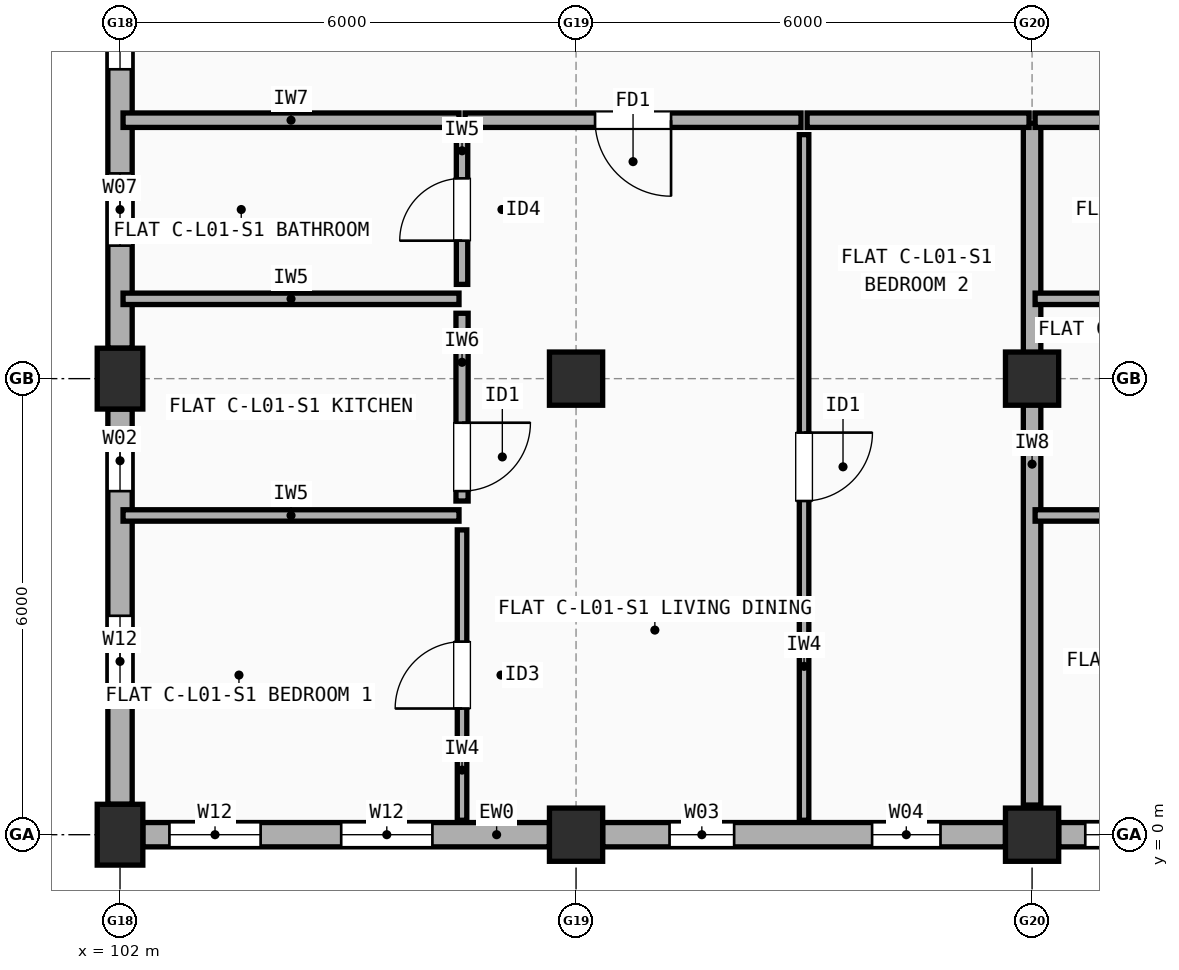
"""IFC4 building model, lengths in metres.
Left out: names, types, materials, properties, quantities, classifications, styles, units other than length and angle.
Written with IfcOpenShell. Run it as: python <this file> out.ifc"""

import sys

from ifc_helpers import new_model, si_unit, direction, frame, frame_2d, origin, origin_2d, place, context, subcontext, project, spatial, rectangle, extrude, element, fill, save


model = new_model("IFC4")
c1 = context("Model", 3, precision=1e-05, world=origin(), true_north=direction((0.0, 1.0)))
c2 = subcontext(c1, "Body", "Model", "MODEL_VIEW")
j1 = project(units=[si_unit("LENGTHUNIT", "METRE"), si_unit("PLANEANGLEUNIT", "RADIAN")], contexts=[c1])
p1 = place(None, origin())
s1 = spatial("IfcSite", under=j1, at=p1, CompositionType="ELEMENT")
p2 = place(p1, origin())
s2 = spatial("IfcBuilding", under=s1, at=p2, CompositionType="ELEMENT")
p3 = place(p2, frame((0.0, 0.0, 4.5)))
s3 = spatial("IfcBuildingStorey", under=s2, at=p3, CompositionType="ELEMENT", Elevation=4.5)
for number, where, z_axis, x_axis in (
    (1, (102.0, 0.0, 0.0), (0.0, 0.0, 1.0), (1.0, 0.0, 0.0)),
    (2, (102.0, 6.0, 0.0), (0.0, 0.0, 1.0), (1.0, 0.0, 0.0)),
):
    element("IfcColumn", number, at=place(p3, frame(where, z_axis=z_axis, x_axis=x_axis)), inside=s3, PredefinedType="COLUMN", context=c2, shape_type="SweptSolid", body=[
        extrude(rectangle(XDim=0.6, YDim=0.8, at=origin_2d()), origin(), (0.0, 0.0, 1.0), 2.945),
    ])
for number, where, z_axis, x_axis in (
    (3, (108.0, 0.0, 0.0), (0.0, 0.0, 1.0), (1.0, 0.0, 0.0)),
    (4, (108.0, 6.0, 0.0), (0.0, 0.0, 1.0), (1.0, 0.0, 0.0)),
    (5, (114.0, 0.0, 0.0), (0.0, 0.0, 1.0), (1.0, 0.0, 0.0)),
    (6, (114.0, 6.0, 0.0), (0.0, 0.0, 1.0), (1.0, 0.0, 0.0)),
):
    element("IfcColumn", number, at=place(p3, frame(where, z_axis=z_axis, x_axis=x_axis)), inside=s3, PredefinedType="COLUMN", context=c2, shape_type="SweptSolid", body=[
        extrude(rectangle(XDim=0.7, YDim=0.7, at=origin_2d()), origin(), (0.0, 0.0, 1.0), 2.945),
    ])
p4 = place(p3, frame((102.3, 0.0, 0.0), z_axis=(0.0, 0.0, 1.0), x_axis=(1.0, 0.0, 0.0)))
e7 = element("IfcWall", 7, at=p4, inside=s3, PredefinedType="STANDARD", context=c2, shape_type="SweptSolid", body=[
    extrude(rectangle(XDim=5.35, YDim=0.32, at=frame_2d((2.675, 0.0))), origin(), (0.0, 0.0, 1.0), 2.427),
])
p5 = place(p4, frame((0.35, 0.0, 0.9)))
e8 = element("IfcOpeningElement", 8, at=p5, cuts=e7, PredefinedType="OPENING", context=c2, shape_type="SweptSolid", body=[
    extrude(rectangle(XDim=1.2, YDim=1.35, at=frame_2d((0.6, 0.675))), frame((0.0, 0.17, 0.0), z_axis=(0.0, -1.0, 0.0), x_axis=(1.0, 0.0, 0.0)), (0.0, 0.0, 1.0), 0.34),
])
p6 = place(p4, frame((2.61, 0.0, 0.9)))
e9 = element("IfcOpeningElement", 9, at=p6, cuts=e7, PredefinedType="OPENING", context=c2, shape_type="SweptSolid", body=[
    extrude(rectangle(XDim=1.2, YDim=1.35, at=frame_2d((0.6, 0.675))), frame((0.0, 0.17, 0.0), z_axis=(0.0, -1.0, 0.0), x_axis=(1.0, 0.0, 0.0)), (0.0, 0.0, 1.0), 0.34),
])
p7 = place(p3, frame((108.35, 0.0, 0.0), z_axis=(0.0, 0.0, 1.0), x_axis=(1.0, 0.0, 0.0)))
e10 = element("IfcWall", 10, at=p7, inside=s3, PredefinedType="STANDARD", context=c2, shape_type="SweptSolid", body=[
    extrude(rectangle(XDim=5.3, YDim=0.32, at=frame_2d((2.65, 0.0))), origin(), (0.0, 0.0, 1.0), 2.427),
])
p8 = place(p7, frame((0.88, 0.0, 0.9)))
e11 = element("IfcOpeningElement", 11, at=p8, cuts=e10, PredefinedType="OPENING", context=c2, shape_type="SweptSolid", body=[
    extrude(rectangle(XDim=0.85, YDim=1.25, at=frame_2d((0.425, 0.625))), frame((0.0, 0.17, 0.0), z_axis=(0.0, -1.0, 0.0), x_axis=(1.0, 0.0, 0.0)), (0.0, 0.0, 1.0), 0.34),
])
p9 = place(p7, frame((3.545, 0.0, 0.9)))
e12 = element("IfcOpeningElement", 12, at=p9, cuts=e10, PredefinedType="OPENING", context=c2, shape_type="SweptSolid", body=[
    extrude(rectangle(XDim=0.9, YDim=1.3, at=frame_2d((0.45, 0.65))), frame((0.0, 0.17, 0.0), z_axis=(0.0, -1.0, 0.0), x_axis=(1.0, 0.0, 0.0)), (0.0, 0.0, 1.0), 0.34),
])
p10 = place(p3, frame((114.35, 0.0, 0.0), z_axis=(0.0, 0.0, 1.0), x_axis=(1.0, 0.0, 0.0)))
e13 = element("IfcWall", 13, at=p10, inside=s3, PredefinedType="STANDARD", context=c2, shape_type="SweptSolid", body=[
    extrude(rectangle(XDim=5.3, YDim=0.32, at=frame_2d((2.65, 0.0))), origin(), (0.0, 0.0, 1.0), 2.427),
])
p11 = place(p10, frame((0.35, 0.0, 0.9)))
e14 = element("IfcOpeningElement", 14, at=p11, cuts=e13, PredefinedType="OPENING", context=c2, shape_type="SweptSolid", body=[
    extrude(rectangle(XDim=0.95, YDim=1.35, at=frame_2d((0.475, 0.675))), frame((0.0, 0.17, 0.0), z_axis=(0.0, -1.0, 0.0), x_axis=(1.0, 0.0, 0.0)), (0.0, 0.0, 1.0), 0.34),
])
p12 = place(p10, frame((2.81, 0.0, 0.9)))
e15 = element("IfcOpeningElement", 15, at=p12, cuts=e13, PredefinedType="OPENING", context=c2, shape_type="SweptSolid", body=[
    extrude(rectangle(XDim=0.95, YDim=1.35, at=frame_2d((0.475, 0.675))), frame((0.0, 0.17, 0.0), z_axis=(0.0, -1.0, 0.0), x_axis=(1.0, 0.0, 0.0)), (0.0, 0.0, 1.0), 0.34),
])
p13 = place(p3, frame((102.0, 11.6, 0.0), z_axis=(0.0, 0.0, 1.0), x_axis=(0.0, -1.0, 0.0)))
e16 = element("IfcWall", 16, at=p13, inside=s3, PredefinedType="STANDARD", context=c2, shape_type="SweptSolid", body=[
    extrude(rectangle(XDim=5.2, YDim=0.32, at=frame_2d((2.6, 0.0))), origin(), (0.0, 0.0, 1.0), 2.427),
])
p14 = place(p13, frame((0.63, 0.0, 0.9)))
e17 = element("IfcOpeningElement", 17, at=p14, cuts=e16, PredefinedType="OPENING", context=c2, shape_type="SweptSolid", body=[
    extrude(rectangle(XDim=0.9, YDim=1.3, at=frame_2d((0.45, 0.65))), frame((0.0, 0.17, 0.0), z_axis=(0.0, -1.0, 0.0), x_axis=(1.0, 0.0, 0.0)), (0.0, 0.0, 1.0), 0.34),
])
p15 = place(p13, frame((2.9, 0.0, 0.9)))
e18 = element("IfcOpeningElement", 18, at=p15, cuts=e16, PredefinedType="OPENING", context=c2, shape_type="SweptSolid", body=[
    extrude(rectangle(XDim=0.95, YDim=1.35, at=frame_2d((0.475, 0.675))), frame((0.0, 0.17, 0.0), z_axis=(0.0, -1.0, 0.0), x_axis=(1.0, 0.0, 0.0)), (0.0, 0.0, 1.0), 0.34),
])
p16 = place(p3, frame((102.0, 5.6, 0.0), z_axis=(0.0, 0.0, 1.0), x_axis=(0.0, -1.0, 0.0)))
e19 = element("IfcWall", 19, at=p16, inside=s3, PredefinedType="STANDARD", context=c2, shape_type="SweptSolid", body=[
    extrude(rectangle(XDim=5.2, YDim=0.32, at=frame_2d((2.6, 0.0))), origin(), (0.0, 0.0, 1.0), 2.427),
])
p17 = place(p16, frame((0.28, 0.0, 0.9)))
e20 = element("IfcOpeningElement", 20, at=p17, cuts=e19, PredefinedType="OPENING", context=c2, shape_type="SweptSolid", body=[
    extrude(rectangle(XDim=0.8, YDim=1.2, at=frame_2d((0.4, 0.6))), frame((0.0, 0.17, 0.0), z_axis=(0.0, -1.0, 0.0), x_axis=(1.0, 0.0, 0.0)), (0.0, 0.0, 1.0), 0.34),
])
p18 = place(p16, frame((2.72, 0.0, 0.9)))
e21 = element("IfcOpeningElement", 21, at=p18, cuts=e19, PredefinedType="OPENING", context=c2, shape_type="SweptSolid", body=[
    extrude(rectangle(XDim=1.2, YDim=1.35, at=frame_2d((0.6, 0.675))), frame((0.0, 0.17, 0.0), z_axis=(0.0, -1.0, 0.0), x_axis=(1.0, 0.0, 0.0)), (0.0, 0.0, 1.0), 0.34),
])
p19 = place(p3, frame((114.0, 0.39, 0.0), z_axis=(0.0, 0.0, 1.0), x_axis=(0.0, 1.0, 0.0)))
e22 = element("IfcWall", 22, at=p19, inside=s3, PredefinedType="SOLIDWALL", context=c2, shape_type="SweptSolid", body=[
    extrude(rectangle(XDim=8.97, YDim=0.23, at=frame_2d((4.485, 0.0))), origin(), (0.0, 0.0, 1.0), 2.327),
])
p20 = place(p3, frame((102.04, 9.4, 0.0), z_axis=(0.0, 0.0, 1.0), x_axis=(1.0, 0.0, 0.0)))
e23 = element("IfcWall", 23, at=p20, inside=s3, PredefinedType="SOLIDWALL", context=c2, shape_type="SweptSolid", body=[
    extrude(rectangle(XDim=4.42, YDim=0.19, at=frame_2d((2.21, 0.0))), origin(), (0.0, 0.0, 1.0), 2.427),
])
p21 = place(p3, frame((106.54, 9.4, 0.0), z_axis=(0.0, 0.0, 1.0), x_axis=(1.0, 0.0, 0.0)))
e24 = element("IfcWall", 24, at=p21, inside=s3, PredefinedType="SOLIDWALL", context=c2, shape_type="SweptSolid", body=[
    extrude(rectangle(XDim=4.42, YDim=0.19, at=frame_2d((2.21, 0.0))), origin(), (0.0, 0.0, 1.0), 2.327),
])
p22 = place(p21, frame((1.71, 0.0, 0.0)))
e25 = element("IfcOpeningElement", 25, at=p22, cuts=e24, PredefinedType="OPENING", context=c2, shape_type="SweptSolid", body=[
    extrude(rectangle(XDim=1.0, YDim=2.15, at=frame_2d((0.5, 1.075))), frame((0.0, 0.105, 0.0), z_axis=(0.0, -1.0, 0.0), x_axis=(1.0, 0.0, 0.0)), (0.0, 0.0, 1.0), 0.21),
])
p23 = place(p3, frame((106.5, 0.19, 0.0), z_axis=(0.0, 0.0, 1.0), x_axis=(0.0, 1.0, 0.0)))
e26 = element("IfcWall", 26, at=p23, inside=s3, PredefinedType="PARTITIONING", context=c2, shape_type="SweptSolid", body=[
    extrude(rectangle(XDim=3.82, YDim=0.125, at=frame_2d((1.91, 0.0))), origin(), (0.0, 0.0, 1.0), 2.945),
])
p24 = place(p23, frame((1.47, 0.0, 0.0)))
e27 = element("IfcOpeningElement", 27, at=p24, cuts=e26, PredefinedType="OPENING", context=c2, shape_type="SweptSolid", body=[
    extrude(rectangle(XDim=0.88, YDim=2.1, at=frame_2d((0.44, 1.05))), frame((0.0, 0.073, 0.0), z_axis=(0.0, -1.0, 0.0), x_axis=(1.0, 0.0, 0.0)), (0.0, 0.0, 1.0), 0.145),
])
p25 = place(p3, frame((106.5, 4.39, 0.0), z_axis=(0.0, 0.0, 1.0), x_axis=(0.0, 1.0, 0.0)))
e28 = element("IfcWall", 28, at=p25, inside=s3, PredefinedType="PLUMBINGWALL", context=c2, shape_type="SweptSolid", body=[
    extrude(rectangle(XDim=2.47, YDim=0.16, at=frame_2d((1.235, 0.0))), origin(), (0.0, 0.0, 1.0), 2.427),
])
p26 = place(p25, frame((0.13, 0.0, 0.0)))
e29 = element("IfcOpeningElement", 29, at=p26, cuts=e28, PredefinedType="OPENING", context=c2, shape_type="SweptSolid", body=[
    extrude(rectangle(XDim=0.9, YDim=2.1, at=frame_2d((0.45, 1.05))), frame((0.0, 0.09, 0.0), z_axis=(0.0, -1.0, 0.0), x_axis=(1.0, 0.0, 0.0)), (0.0, 0.0, 1.0), 0.18),
])
p27 = place(p3, frame((106.5, 7.24, 0.0), z_axis=(0.0, 0.0, 1.0), x_axis=(0.0, 1.0, 0.0)))
e30 = element("IfcWall", 30, at=p27, inside=s3, PredefinedType="PARTITIONING", context=c2, shape_type="SweptSolid", body=[
    extrude(rectangle(XDim=1.97, YDim=0.15, at=frame_2d((0.985, 0.0))), origin(), (0.0, 0.0, 1.0), 2.945),
])
p28 = place(p27, frame((0.575, 0.0, 0.0)))
e31 = element("IfcOpeningElement", 31, at=p28, cuts=e30, PredefinedType="OPENING", context=c2, shape_type="SweptSolid", body=[
    extrude(rectangle(XDim=0.82, YDim=2.08, at=frame_2d((0.41, 1.04))), frame((0.0, 0.085, 0.0), z_axis=(0.0, -1.0, 0.0), x_axis=(1.0, 0.0, 0.0)), (0.0, 0.0, 1.0), 0.17),
])
for number, where, z_axis, x_axis in (
    (32, (102.04, 4.2, 0.0), (0.0, 0.0, 1.0), (1.0, 0.0, 0.0)),
    (33, (102.04, 7.05, 0.0), (0.0, 0.0, 1.0), (1.0, 0.0, 0.0)),
):
    element("IfcWall", number, at=place(p3, frame(where, z_axis=z_axis, x_axis=x_axis)), inside=s3, PredefinedType="PARTITIONING", context=c2, shape_type="SweptSolid", body=[
        extrude(rectangle(XDim=4.42, YDim=0.15, at=frame_2d((2.21, 0.0))), origin(), (0.0, 0.0, 1.0), 2.427),
    ])
p29 = place(p3, frame((111.04, 9.4, 0.0), z_axis=(0.0, 0.0, 1.0), x_axis=(1.0, 0.0, 0.0)))
e34 = element("IfcWall", 34, at=p29, inside=s3, PredefinedType="SOLIDWALL", context=c2, shape_type="SweptSolid", body=[
    extrude(rectangle(XDim=2.92, YDim=0.19, at=frame_2d((1.46, 0.0))), origin(), (0.0, 0.0, 1.0), 2.327),
])
p30 = place(p3, frame((111.0, 0.19, 0.0), z_axis=(0.0, 0.0, 1.0), x_axis=(0.0, 1.0, 0.0)))
e35 = element("IfcWall", 35, at=p30, inside=s3, PredefinedType="PARTITIONING", context=c2, shape_type="SweptSolid", body=[
    extrude(rectangle(XDim=9.02, YDim=0.125, at=frame_2d((4.51, 0.0))), origin(), (0.0, 0.0, 1.0), 2.427),
])
p31 = place(p30, frame((4.2, 0.0, 0.0)))
e36 = element("IfcOpeningElement", 36, at=p31, cuts=e35, PredefinedType="OPENING", context=c2, shape_type="SweptSolid", body=[
    extrude(rectangle(XDim=0.9, YDim=2.1, at=frame_2d((0.45, 1.05))), frame((0.0, 0.073, 0.0), z_axis=(0.0, -1.0, 0.0), x_axis=(1.0, 0.0, 0.0)), (0.0, 0.0, 1.0), 0.145),
])
p32 = place(p3, frame((114.04, 9.4, 0.0), z_axis=(0.0, 0.0, 1.0), x_axis=(1.0, 0.0, 0.0)))
e37 = element("IfcWall", 37, at=p32, inside=s3, PredefinedType="SOLIDWALL", context=c2, shape_type="SweptSolid", body=[
    extrude(rectangle(XDim=4.42, YDim=0.19, at=frame_2d((2.21, 0.0))), origin(), (0.0, 0.0, 1.0), 2.327),
])
for number, where, z_axis, x_axis in (
    (38, (114.04, 4.2, 0.0), (0.0, 0.0, 1.0), (1.0, 0.0, 0.0)),
    (39, (114.04, 7.05, 0.0), (0.0, 0.0, 1.0), (1.0, 0.0, 0.0)),
):
    element("IfcWall", number, at=place(p3, frame(where, z_axis=z_axis, x_axis=x_axis)), inside=s3, PredefinedType="PARTITIONING", context=c2, shape_type="SweptSolid", body=[
        extrude(rectangle(XDim=4.42, YDim=0.15, at=frame_2d((2.21, 0.0))), origin(), (0.0, 0.0, 1.0), 2.327),
    ])
p33 = place(p5, origin())
e40 = element("IfcWindow", 40, at=p33, inside=s3, PartitioningType="SINGLE_PANEL", PredefinedType="WINDOW", context=c2, shape_type="SweptSolid", body=[
    extrude(rectangle(XDim=1.2, YDim=1.35, at=frame_2d((0.6, 0.675))), frame((0.0, 0.03, 0.0), z_axis=(0.0, -1.0, 0.0), x_axis=(1.0, 0.0, 0.0)), (0.0, 0.0, 1.0), 0.06),
])
fill(e8, e40)
p34 = place(p6, origin())
e41 = element("IfcWindow", 41, at=p34, inside=s3, PartitioningType="SINGLE_PANEL", PredefinedType="WINDOW", context=c2, shape_type="SweptSolid", body=[
    extrude(rectangle(XDim=1.2, YDim=1.35, at=frame_2d((0.6, 0.675))), frame((0.0, 0.03, 0.0), z_axis=(0.0, -1.0, 0.0), x_axis=(1.0, 0.0, 0.0)), (0.0, 0.0, 1.0), 0.06),
])
fill(e9, e41)
p35 = place(p8, origin())
e42 = element("IfcWindow", 42, at=p35, inside=s3, PartitioningType="SINGLE_PANEL", PredefinedType="WINDOW", context=c2, shape_type="SweptSolid", body=[
    extrude(rectangle(XDim=0.85, YDim=1.25, at=frame_2d((0.425, 0.625))), frame((0.0, 0.03, 0.0), z_axis=(0.0, -1.0, 0.0), x_axis=(1.0, 0.0, 0.0)), (0.0, 0.0, 1.0), 0.06),
])
fill(e11, e42)
p36 = place(p9, origin())
e43 = element("IfcWindow", 43, at=p36, inside=s3, PartitioningType="SINGLE_PANEL", PredefinedType="WINDOW", context=c2, shape_type="SweptSolid", body=[
    extrude(rectangle(XDim=0.9, YDim=1.3, at=frame_2d((0.45, 0.65))), frame((0.0, 0.03, 0.0), z_axis=(0.0, -1.0, 0.0), x_axis=(1.0, 0.0, 0.0)), (0.0, 0.0, 1.0), 0.06),
])
fill(e12, e43)
p37 = place(p11, origin())
e44 = element("IfcWindow", 44, at=p37, inside=s3, PartitioningType="SINGLE_PANEL", PredefinedType="WINDOW", context=c2, shape_type="SweptSolid", body=[
    extrude(rectangle(XDim=0.95, YDim=1.35, at=frame_2d((0.475, 0.675))), frame((0.0, 0.03, 0.0), z_axis=(0.0, -1.0, 0.0), x_axis=(1.0, 0.0, 0.0)), (0.0, 0.0, 1.0), 0.06),
])
fill(e14, e44)
p38 = place(p14, origin())
e45 = element("IfcWindow", 45, at=p38, inside=s3, PartitioningType="SINGLE_PANEL", PredefinedType="WINDOW", context=c2, shape_type="SweptSolid", body=[
    extrude(rectangle(XDim=0.9, YDim=1.3, at=frame_2d((0.45, 0.65))), frame((0.0, 0.03, 0.0), z_axis=(0.0, -1.0, 0.0), x_axis=(1.0, 0.0, 0.0)), (0.0, 0.0, 1.0), 0.06),
])
fill(e17, e45)
p39 = place(p15, origin())
e46 = element("IfcWindow", 46, at=p39, inside=s3, PartitioningType="SINGLE_PANEL", PredefinedType="WINDOW", context=c2, shape_type="SweptSolid", body=[
    extrude(rectangle(XDim=0.95, YDim=1.35, at=frame_2d((0.475, 0.675))), frame((0.0, 0.03, 0.0), z_axis=(0.0, -1.0, 0.0), x_axis=(1.0, 0.0, 0.0)), (0.0, 0.0, 1.0), 0.06),
])
fill(e18, e46)
p40 = place(p17, origin())
e47 = element("IfcWindow", 47, at=p40, inside=s3, PartitioningType="SINGLE_PANEL", PredefinedType="WINDOW", context=c2, shape_type="SweptSolid", body=[
    extrude(rectangle(XDim=0.8, YDim=1.2, at=frame_2d((0.4, 0.6))), frame((0.0, 0.03, 0.0), z_axis=(0.0, -1.0, 0.0), x_axis=(1.0, 0.0, 0.0)), (0.0, 0.0, 1.0), 0.06),
])
fill(e20, e47)
p41 = place(p18, origin())
e48 = element("IfcWindow", 48, at=p41, inside=s3, PartitioningType="SINGLE_PANEL", PredefinedType="WINDOW", context=c2, shape_type="SweptSolid", body=[
    extrude(rectangle(XDim=1.2, YDim=1.35, at=frame_2d((0.6, 0.675))), frame((0.0, 0.03, 0.0), z_axis=(0.0, -1.0, 0.0), x_axis=(1.0, 0.0, 0.0)), (0.0, 0.0, 1.0), 0.06),
])
fill(e21, e48)
p42 = place(p22, origin())
e49 = element("IfcDoor", 49, at=p42, inside=s3, OperationType="SINGLE_SWING_RIGHT", PredefinedType="DOOR", context=c2, shape_type="SweptSolid", body=[
    extrude(rectangle(XDim=1.0, YDim=2.15, at=frame_2d((0.5, 1.075))), frame((0.0, 0.025, 0.0), z_axis=(0.0, -1.0, 0.0), x_axis=(1.0, 0.0, 0.0)), (0.0, 0.0, 1.0), 0.05),
])
fill(e25, e49)
p43 = place(p24, origin())
e50 = element("IfcDoor", 50, at=p43, inside=s3, OperationType="SINGLE_SWING_LEFT", PredefinedType="DOOR", context=c2, shape_type="SweptSolid", body=[
    extrude(rectangle(XDim=0.88, YDim=2.1, at=frame_2d((0.44, 1.05))), frame((0.0, 0.025, 0.0), z_axis=(0.0, -1.0, 0.0), x_axis=(1.0, 0.0, 0.0)), (0.0, 0.0, 1.0), 0.05),
])
fill(e27, e50)
p44 = place(p26, origin())
e51 = element("IfcDoor", 51, at=p44, inside=s3, OperationType="SINGLE_SWING_RIGHT", PredefinedType="DOOR", context=c2, shape_type="SweptSolid", body=[
    extrude(rectangle(XDim=0.9, YDim=2.1, at=frame_2d((0.45, 1.05))), frame((0.0, 0.025, 0.0), z_axis=(0.0, -1.0, 0.0), x_axis=(1.0, 0.0, 0.0)), (0.0, 0.0, 1.0), 0.05),
])
fill(e29, e51)
p45 = place(p28, origin())
e52 = element("IfcDoor", 52, at=p45, inside=s3, OperationType="SINGLE_SWING_LEFT", PredefinedType="DOOR", context=c2, shape_type="SweptSolid", body=[
    extrude(rectangle(XDim=0.82, YDim=2.08, at=frame_2d((0.41, 1.04))), frame((0.0, 0.025, 0.0), z_axis=(0.0, -1.0, 0.0), x_axis=(1.0, 0.0, 0.0)), (0.0, 0.0, 1.0), 0.05),
])
fill(e31, e52)
p46 = place(p31, origin())
e53 = element("IfcDoor", 53, at=p46, inside=s3, OperationType="SINGLE_SWING_RIGHT", PredefinedType="DOOR", context=c2, shape_type="SweptSolid", body=[
    extrude(rectangle(XDim=0.9, YDim=2.1, at=frame_2d((0.45, 1.05))), frame((0.0, 0.025, 0.0), z_axis=(0.0, -1.0, 0.0), x_axis=(1.0, 0.0, 0.0)), (0.0, 0.0, 1.0), 0.05),
])
fill(e36, e53)
save(model, sys.argv[1])
